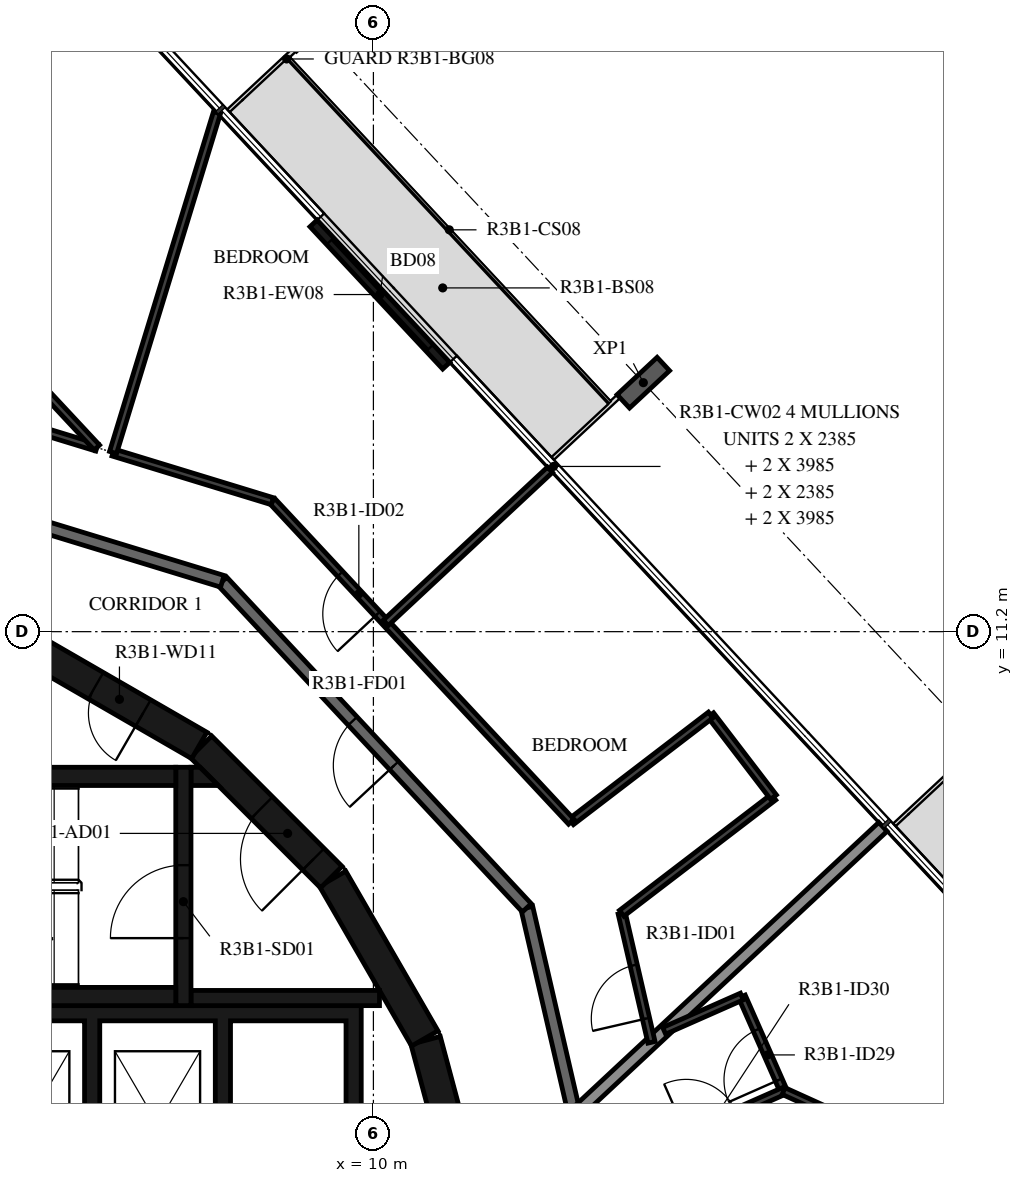
"""IFC4 building model, lengths in metres.
Left out: names, types, materials, properties, quantities, classifications, styles, units other than length and angle.
Written with IfcOpenShell. Run it as: python <this file> out.ifc"""

import sys

from ifc_helpers import new_model, si_unit, direction, frame, frame_2d, origin, origin_2d, place, context, subcontext, project, spatial, polyline, rectangle, i_section, outline, extrude, element, fill, save


model = new_model("IFC4")
c1 = context("Model", 3, precision=1e-05, world=origin(), true_north=direction((0.0, 1.0)))
c2 = subcontext(c1, "Body", "Model", "MODEL_VIEW")
j1 = project(units=[si_unit("LENGTHUNIT", "METRE"), si_unit("PLANEANGLEUNIT", "RADIAN")], contexts=[c1])
p1 = place(None, origin())
s1 = spatial("IfcSite", under=j1, at=p1, CompositionType="ELEMENT")
p2 = place(p1, origin())
s2 = spatial("IfcBuilding", under=s1, at=p2, CompositionType="ELEMENT")
p3 = place(p2, frame((0.0, 0.0, 123.9)))
s3 = spatial("IfcBuildingStorey", under=s2, at=p3, CompositionType="ELEMENT", Elevation=123.9)
p4 = place(p3, frame((14.439, 15.294, -0.38), z_axis=(0.0, 0.0, 1.0), x_axis=(0.68199801865, -0.731354019992, 0.0)))
e1 = element("IfcColumn", 1, at=p4, inside=s3, PredefinedType="COLUMN", context=c2, shape_type="SweptSolid", body=[
    extrude(i_section(OverallWidth=0.3, OverallDepth=0.9, WebThickness=0.019, FlangeThickness=0.035, FilletRadius=0.03, at=origin_2d()), origin(), (0.0, 0.0, 1.0), 3.5),
])
p5 = place(p3, frame((11.198, 15.574, 0.0), z_axis=(0.0, 0.0, 1.0), x_axis=(-0.681994703002, 0.731357111866, 0.0)))
e2 = element("IfcWall", 2, at=p5, inside=s3, PredefinedType="STANDARD", context=c2, shape_type="SweptSolid", body=[
    extrude(rectangle(XDim=3.2, YDim=0.16, at=frame_2d((1.6, 0.0))), origin(), (0.0, 0.0, 1.0), 3.12),
])
p6 = place(p5, frame((0.4, 0.0, 0.0)))
e3 = element("IfcOpeningElement", 3, at=p6, cuts=e2, PredefinedType="OPENING", context=c2, shape_type="SweptSolid", body=[
    extrude(rectangle(XDim=2.4, YDim=2.4, at=frame_2d((1.2, 1.2))), frame((0.0, 0.09, 0.0), z_axis=(0.0, -1.0, 0.0), x_axis=(1.0, 0.0, 0.0)), (0.0, 0.0, 1.0), 0.18),
])
for number, where, z_axis, x_axis in (
    (4, (11.643, 1.55, 0.0), (0.0, 0.0, 1.0), (-0.259, 0.966, 0.0)),
    (5, (10.845, 4.51, 0.0), (0.0, 0.0, 1.0), (-0.5, 0.866, 0.0)),
):
    element("IfcWall", number, at=place(p3, frame(where, z_axis=z_axis, x_axis=x_axis)), inside=s3, PredefinedType="SHEAR", context=c2, shape_type="SweptSolid", body=[
        extrude(rectangle(XDim=3.033, YDim=0.5, at=frame_2d((1.516, 0.0))), origin(), (0.0, 0.0, 1.0), 3.12),
    ])
p7 = place(p3, frame((9.308, 7.164, 0.0), z_axis=(0.0, 0.0, 1.0), x_axis=(-0.707106781187, 0.707106781187, 0.0)))
e6 = element("IfcWall", 6, at=p7, inside=s3, PredefinedType="SHEAR", context=c2, shape_type="SweptSolid", body=[
    extrude(rectangle(XDim=3.032, YDim=0.5, at=frame_2d((1.516, 0.0))), origin(), (0.0, 0.0, 1.0), 3.12),
])
p8 = place(p7, frame((0.416, 0.0, 0.0)))
e7 = element("IfcOpeningElement", 7, at=p8, cuts=e6, PredefinedType="OPENING", context=c2, shape_type="SweptSolid", body=[
    extrude(rectangle(XDim=1.2, YDim=2.1, at=frame_2d((0.6, 1.05))), frame((0.0, 0.26, 0.0), z_axis=(0.0, -1.0, 0.0), x_axis=(1.0, 0.0, 0.0)), (0.0, 0.0, 1.0), 0.52),
])
p9 = place(p3, frame((7.137, 9.329, 0.0), z_axis=(0.0, 0.0, 1.0), x_axis=(-0.865975092491, 0.500087131594, 0.0)))
e8 = element("IfcWall", 8, at=p9, inside=s3, PredefinedType="SHEAR", context=c2, shape_type="SweptSolid", body=[
    extrude(rectangle(XDim=3.033, YDim=0.5, at=frame_2d((1.516, 0.0))), origin(), (0.0, 0.0, 1.0), 3.12),
])
p10 = place(p9, frame((1.066, 0.0, 0.0)))
e9 = element("IfcOpeningElement", 9, at=p10, cuts=e8, PredefinedType="OPENING", context=c2, shape_type="SweptSolid", body=[
    extrude(rectangle(XDim=0.9, YDim=2.1, at=frame_2d((0.45, 1.05))), frame((0.0, 0.26, 0.0), z_axis=(0.0, -1.0, 0.0), x_axis=(1.0, 0.0, 0.0)), (0.0, 0.0, 1.0), 0.52),
])
for number, where, z_axis, x_axis in (
    (10, (0.0, 5.2, 0.0), (0.0, 0.0, 1.0), (1.0, 0.0, 0.0)),
    (11, (0.0, 8.82, 0.0), (0.0, 0.0, 1.0), (1.0, 0.0, 0.0)),
):
    element("IfcWall", number, at=place(p3, frame(where, z_axis=z_axis, x_axis=x_axis)), inside=s3, PredefinedType="SHEAR", context=c2, shape_type="SweptSolid", body=[
        extrude(rectangle(XDim=6.75, YDim=0.3, at=frame_2d((3.375, 0.0))), origin(), (0.0, 0.0, 1.0), 3.12),
    ])
p11 = place(p3, frame((6.875, 5.05, 0.0), z_axis=(0.0, 0.0, 1.0), x_axis=(0.0, 1.0, 0.0)))
e12 = element("IfcWall", 12, at=p11, inside=s3, PredefinedType="SHEAR", context=c2, shape_type="SweptSolid", body=[
    extrude(rectangle(XDim=3.92, YDim=0.25, at=frame_2d((1.96, 0.0))), origin(), (0.0, 0.0, 1.0), 3.12),
])
p12 = place(p11, frame((1.11, 0.0, 0.0)))
e13 = element("IfcOpeningElement", 13, at=p12, cuts=e12, PredefinedType="OPENING", context=c2, shape_type="SweptSolid", body=[
    extrude(rectangle(XDim=1.2, YDim=2.1, at=frame_2d((0.6, 1.05))), frame((0.0, 0.135, 0.0), z_axis=(0.0, -1.0, 0.0), x_axis=(1.0, 0.0, 0.0)), (0.0, 0.0, 1.0), 0.27),
])
p13 = place(p3, frame((7.0, 5.175, 0.0), z_axis=(0.0, 0.0, 1.0), x_axis=(1.0, 0.0, 0.0)))
e14 = element("IfcWall", 14, at=p13, inside=s3, PredefinedType="SHEAR", context=c2, shape_type="SweptSolid", body=[
    extrude(rectangle(XDim=3.1, YDim=0.25, at=frame_2d((1.55, 0.0))), origin(), (0.0, 0.0, 1.0), 3.12),
])
p14 = place(p3, origin())
e15 = element("IfcWall", 15, at=p14, inside=s3, PredefinedType="SHEAR", context=c2, shape_type="SweptSolid", body=[
    extrude(outline(polyline([(7.448, 8.67), (7.0, 8.67), (7.0, 8.97), (7.148, 8.97), (7.448, 8.67)])), origin(), (0.0, 0.0, 1.0), 3.12),
])
p15 = place(p3, origin())
e16 = element("IfcWall", 16, at=p15, inside=s3, PredefinedType="SHEAR", context=c2, shape_type="SweptSolid", body=[
    extrude(outline(polyline([(-9.55, 4.8), (-7.65, 4.8), (-7.65, 1.9), (-7.4, 1.9), (-7.4, 4.8), (-5.5, 4.8), (-5.5, 1.9), (-5.25, 1.9), (-5.25, 4.8), (-3.35, 4.8), (-3.35, 1.9), (-3.1, 1.9), (-3.1, 4.8), (-1.2, 4.8), (-1.2, 1.9), (-0.95, 1.9), (-0.95, 4.8), (3.1, 4.8), (3.1, 1.9), (3.35, 1.9), (3.35, 4.8), (5.25, 4.8), (5.25, 1.9), (5.5, 1.9), (5.5, 4.8), (7.4, 4.8), (7.4, 1.9), (7.65, 1.9), (7.65, 4.8), (9.55, 4.8), (9.55, 1.9), (9.8, 1.9), (9.8, 4.8), (9.8, 5.05), (-9.8, 5.05), (-9.8, 4.8), (-9.8, 1.9), (-9.55, 1.9), (-9.55, 4.8)])), origin(), (0.0, 0.0, 1.0), 3.12),
])
p16 = place(p3, frame((14.175, -0.495, 0.0), z_axis=(0.0, 0.0, 1.0), x_axis=(-0.224922649383, 0.974376622151, 0.0)))
e17 = element("IfcWall", 17, at=p16, inside=s3, PredefinedType="STANDARD", context=c2, shape_type="SweptSolid", body=[
    extrude(rectangle(XDim=7.342, YDim=0.2, at=frame_2d((3.671, 0.0))), origin(), (0.0, 0.0, 1.0), 3.12),
])
p17 = place(p16, frame((2.655, 0.0, 0.0)))
e18 = element("IfcOpeningElement", 18, at=p17, cuts=e17, PredefinedType="OPENING", context=c2, shape_type="SweptSolid", body=[
    extrude(rectangle(XDim=1.0, YDim=2.1, at=frame_2d((0.5, 1.05))), frame((0.0, 0.11, 0.0), z_axis=(0.0, -1.0, 0.0), x_axis=(1.0, 0.0, 0.0)), (0.0, 0.0, 1.0), 0.22),
])
p18 = place(p3, frame((12.523, 6.659, 0.0), z_axis=(0.0, 0.0, 1.0), x_axis=(-0.682001841105, 0.731350455479, 0.0)))
e19 = element("IfcWall", 19, at=p18, inside=s3, PredefinedType="STANDARD", context=c2, shape_type="SweptSolid", body=[
    extrude(rectangle(XDim=7.342, YDim=0.2, at=frame_2d((3.671, 0.0))), origin(), (0.0, 0.0, 1.0), 3.12),
])
p19 = place(p18, frame((3.2, 0.0, 0.0)))
e20 = element("IfcOpeningElement", 20, at=p19, cuts=e19, PredefinedType="OPENING", context=c2, shape_type="SweptSolid", body=[
    extrude(rectangle(XDim=1.0, YDim=2.1, at=frame_2d((0.5, 1.05))), frame((0.0, 0.11, 0.0), z_axis=(0.0, -1.0, 0.0), x_axis=(1.0, 0.0, 0.0)), (0.0, 0.0, 1.0), 0.22),
])
p20 = place(p3, frame((7.516, 12.028, 0.0), z_axis=(0.0, 0.0, 1.0), x_axis=(-0.956306642771, 0.292365533182, 0.0)))
e21 = element("IfcWall", 21, at=p20, inside=s3, PredefinedType="STANDARD", context=c2, shape_type="SweptSolid", body=[
    extrude(rectangle(XDim=7.342, YDim=0.2, at=frame_2d((3.671, 0.0))), origin(), (0.0, 0.0, 1.0), 3.12),
])
p21 = place(p3, frame((13.308, 3.261, 0.0), z_axis=(0.0, 0.0, 1.0), x_axis=(0.731356087831, 0.681995801154, 0.0)))
e22 = element("IfcWall", 22, at=p21, inside=s3, PredefinedType="STANDARD", context=c2, shape_type="SweptSolid", body=[
    extrude(rectangle(XDim=6.934, YDim=0.2, at=frame_2d((3.467, 0.0))), origin(), (0.0, 0.0, 1.0), 2.73),
])
p22 = place(p3, frame((14.573, 4.447, 0.0), z_axis=(0.0, 0.0, 1.0), x_axis=(-0.225006886074, 0.97435717333, 0.0)))
e23 = element("IfcWall", 23, at=p22, inside=s3, PredefinedType="PARTITIONING", context=c2, shape_type="SweptSolid", body=[
    extrude(rectangle(XDim=2.178, YDim=0.12, at=frame_2d((1.089, 0.0))), origin(), (0.0, 0.0, 1.0), 3.12),
])
p23 = place(p22, frame((0.4, 0.0, 0.0)))
e24 = element("IfcOpeningElement", 24, at=p23, cuts=e23, PredefinedType="OPENING", context=c2, shape_type="SweptSolid", body=[
    extrude(rectangle(XDim=0.9, YDim=2.1, at=frame_2d((0.45, 1.05))), frame((0.0, 0.07, 0.0), z_axis=(0.0, -1.0, 0.0), x_axis=(1.0, 0.0, 0.0)), (0.0, 0.0, 1.0), 0.14),
])
p24 = place(p3, frame((14.083, 6.569, 0.0), z_axis=(0.0, 0.0, 1.0), x_axis=(0.794099847012, 0.607787325449, 0.0)))
e25 = element("IfcWall", 25, at=p24, inside=s3, PredefinedType="PARTITIONING", context=c2, shape_type="SweptSolid", body=[
    extrude(rectangle(XDim=3.144, YDim=0.12, at=frame_2d((1.572, 0.0))), origin(), (0.0, 0.0, 1.0), 3.12),
])
p25 = place(p3, frame((16.58, 8.479, 0.0), z_axis=(0.0, 0.0, 1.0), x_axis=(-0.607897770777, 0.794015302298, 0.0)))
e26 = element("IfcWall", 26, at=p25, inside=s3, PredefinedType="PARTITIONING", context=c2, shape_type="SweptSolid", body=[
    extrude(rectangle(XDim=1.7, YDim=0.12, at=frame_2d((0.85, 0.0))), origin(), (0.0, 0.0, 1.0), 3.12),
])
p26 = place(p3, frame((15.546, 9.829, 0.0), z_axis=(0.0, 0.0, 1.0), x_axis=(-0.794096114645, -0.607792201912, 0.0)))
e27 = element("IfcWall", 27, at=p26, inside=s3, PredefinedType="PARTITIONING", context=c2, shape_type="SweptSolid", body=[
    extrude(rectangle(XDim=2.887, YDim=0.12, at=frame_2d((1.443, 0.0))), origin(), (0.0, 0.0, 1.0), 3.12),
])
p27 = place(p3, frame((13.254, 8.075, 0.0), z_axis=(0.0, 0.0, 1.0), x_axis=(-0.681995901471, 0.731355994285, 0.0)))
e28 = element("IfcWall", 28, at=p27, inside=s3, PredefinedType="PARTITIONING", context=c2, shape_type="SweptSolid", body=[
    extrude(rectangle(XDim=7.207, YDim=0.12, at=frame_2d((3.603, 0.0))), origin(), (0.0, 0.0, 1.0), 3.12),
])
p28 = place(p27, frame((4.672, 0.0, 0.0)))
e29 = element("IfcOpeningElement", 29, at=p28, cuts=e28, PredefinedType="OPENING", context=c2, shape_type="SweptSolid", body=[
    extrude(rectangle(XDim=0.9, YDim=2.1, at=frame_2d((0.45, 1.05))), frame((0.0, 0.07, 0.0), z_axis=(0.0, -1.0, 0.0), x_axis=(1.0, 0.0, 0.0)), (0.0, 0.0, 1.0), 0.14),
])
p29 = place(p3, frame((8.339, 13.345, 0.0), z_axis=(0.0, 0.0, 1.0), x_axis=(-0.956324586315, 0.292306834695, 0.0)))
e30 = element("IfcWall", 30, at=p29, inside=s3, PredefinedType="PARTITIONING", context=c2, shape_type="SweptSolid", body=[
    extrude(rectangle(XDim=2.74, YDim=0.12, at=frame_2d((1.37, 0.0))), origin(), (0.0, 0.0, 1.0), 3.12),
])
p30 = place(p3, frame((5.453, 14.228, 0.0), z_axis=(0.0, 0.0, 1.0), x_axis=(-0.95630868333, 0.292358858576, 0.0)))
e31 = element("IfcWall", 31, at=p30, inside=s3, PredefinedType="PARTITIONING", context=c2, shape_type="SweptSolid", body=[
    extrude(rectangle(XDim=5.127, YDim=0.12, at=frame_2d((2.564, 0.0))), origin(), (0.0, 0.0, 1.0), 3.12),
])
p31 = place(p30, frame((1.5, 0.0, 0.0)))
e32 = element("IfcOpeningElement", 32, at=p31, cuts=e31, PredefinedType="OPENING", context=c2, shape_type="SweptSolid", body=[
    extrude(rectangle(XDim=0.9, YDim=2.1, at=frame_2d((0.45, 1.05))), frame((0.0, 0.07, 0.0), z_axis=(0.0, -1.0, 0.0), x_axis=(1.0, 0.0, 0.0)), (0.0, 0.0, 1.0), 0.14),
])
p32 = place(p3, frame((12.903, 13.862, 0.0), z_axis=(0.0, 0.0, 1.0), x_axis=(-0.731380732155, -0.68196937221, 0.0)))
e33 = element("IfcWall", 33, at=p32, inside=s3, PredefinedType="PARTITIONING", context=c2, shape_type="SweptSolid", body=[
    extrude(rectangle(XDim=3.691, YDim=0.12, at=frame_2d((1.845, 0.0))), origin(), (0.0, 0.0, 1.0), 2.73),
])
p33 = place(p3, frame((7.427, 19.734, 0.0), z_axis=(0.0, 0.0, 1.0), x_axis=(-0.292365007065, -0.956306803617, 0.0)))
e34 = element("IfcWall", 34, at=p33, inside=s3, PredefinedType="PARTITIONING", context=c2, shape_type="SweptSolid", body=[
    extrude(rectangle(XDim=5.844, YDim=0.12, at=frame_2d((2.922, 0.0))), origin(), (0.0, 0.0, 1.0), 3.12),
])
p34 = place(p3, frame((-2.646, 22.912, 0.0), z_axis=(0.0, 0.0, 1.0), x_axis=(0.68200318122, -0.731349205788, 0.0)))
e35 = element("IfcWall", 35, at=p34, inside=s3, PredefinedType="PARTITIONING", context=c2, shape_type="SweptSolid", body=[
    extrude(rectangle(XDim=11.874, YDim=0.12, at=frame_2d((5.937, 0.0))), origin(), (0.0, 0.0, 1.0), 3.12),
])
p35 = place(p34, frame((5.752, 0.0, 0.0)))
e36 = element("IfcOpeningElement", 36, at=p35, cuts=e35, PredefinedType="OPENING", context=c2, shape_type="SweptSolid", body=[
    extrude(rectangle(XDim=0.9, YDim=2.1, at=frame_2d((0.45, 1.05))), frame((0.0, 0.07, 0.0), z_axis=(0.0, -1.0, 0.0), x_axis=(1.0, 0.0, 0.0)), (0.0, 0.0, 1.0), 0.14),
])
p36 = place(p34, frame((1.324, 0.0, 0.0)))
e37 = element("IfcOpeningElement", 37, at=p36, cuts=e35, PredefinedType="OPENING", context=c2, shape_type="SweptSolid", body=[
    extrude(rectangle(XDim=0.9, YDim=2.1, at=frame_2d((0.45, 1.05))), frame((0.0, 0.07, 0.0), z_axis=(0.0, -1.0, 0.0), x_axis=(1.0, 0.0, 0.0)), (0.0, 0.0, 1.0), 0.14),
])
p37 = place(p3, frame((16.747, 3.645, 0.0), z_axis=(0.0, 0.0, 1.0), x_axis=(-0.40401852801, 0.914750801598, 0.0)))
e38 = element("IfcWall", 38, at=p37, inside=s3, PredefinedType="PARTITIONING", context=c2, shape_type="SweptSolid", body=[
    extrude(rectangle(XDim=1.7, YDim=0.12, at=frame_2d((0.85, 0.0))), origin(), (0.0, 0.0, 1.0), 3.12),
])
p38 = place(p37, frame((0.2, 0.0, 0.0)))
e39 = element("IfcOpeningElement", 39, at=p38, cuts=e38, PredefinedType="OPENING", context=c2, shape_type="SweptSolid", body=[
    extrude(rectangle(XDim=0.9, YDim=2.1, at=frame_2d((0.45, 1.05))), frame((0.0, 0.07, 0.0), z_axis=(0.0, -1.0, 0.0), x_axis=(1.0, 0.0, 0.0)), (0.0, 0.0, 1.0), 0.14),
])
p39 = place(p3, frame((16.06, 5.2, 0.0), z_axis=(0.0, 0.0, 1.0), x_axis=(-0.91479626238, -0.403915583179, 0.0)))
e40 = element("IfcWall", 40, at=p39, inside=s3, PredefinedType="PARTITIONING", context=c2, shape_type="SweptSolid", body=[
    extrude(rectangle(XDim=1.397, YDim=0.12, at=frame_2d((0.698, 0.0))), origin(), (0.0, 0.0, 1.0), 3.12),
])
p40 = place(p3, frame((14.962, 2.857, 0.0), z_axis=(0.0, 0.0, 1.0), x_axis=(0.914732858216, 0.404059151734, 0.0)))
e41 = element("IfcWall", 41, at=p40, inside=s3, PredefinedType="PARTITIONING", context=c2, shape_type="SweptSolid", body=[
    extrude(rectangle(XDim=1.951, YDim=0.12, at=frame_2d((0.976, 0.0))), origin(), (0.0, 0.0, 1.0), 3.12),
])
p41 = place(p40, frame((0.2, 0.0, 0.0)))
e42 = element("IfcOpeningElement", 42, at=p41, cuts=e41, PredefinedType="OPENING", context=c2, shape_type="SweptSolid", body=[
    extrude(rectangle(XDim=0.9, YDim=2.1, at=frame_2d((0.45, 1.05))), frame((0.0, 0.07, 0.0), z_axis=(0.0, -1.0, 0.0), x_axis=(1.0, 0.0, 0.0)), (0.0, 0.0, 1.0), 0.14),
])
p42 = place(p3, frame((16.747, 3.645, 0.0), z_axis=(0.0, 0.0, 1.0), x_axis=(0.910796273175, -0.412856087238, 0.0)))
e43 = element("IfcWall", 43, at=p42, inside=s3, PredefinedType="PARTITIONING", context=c2, shape_type="SweptSolid", body=[
    extrude(rectangle(XDim=10.901, YDim=0.12, at=frame_2d((5.45, 0.0))), origin(), (0.0, 0.0, 1.0), 3.12),
])
p43 = place(p6, origin())
e44 = element("IfcDoor", 44, at=p43, inside=s3, OperationType="DOUBLE_DOOR_SLIDING", PredefinedType="DOOR", context=c2, shape_type="SweptSolid", body=[
    extrude(rectangle(XDim=2.4, YDim=2.4, at=frame_2d((1.2, 1.2))), frame((0.0, 0.025, 0.0), z_axis=(0.0, -1.0, 0.0), x_axis=(1.0, 0.0, 0.0)), (0.0, 0.0, 1.0), 0.05),
])
fill(e3, e44)
p44 = place(p12, origin())
e45 = element("IfcDoor", 45, at=p44, inside=s3, OperationType="SINGLE_SWING_LEFT", PredefinedType="DOOR", context=c2, shape_type="SweptSolid", body=[
    extrude(rectangle(XDim=1.2, YDim=2.1, at=frame_2d((0.6, 1.05))), frame((0.0, 0.025, 0.0), z_axis=(0.0, -1.0, 0.0), x_axis=(1.0, 0.0, 0.0)), (0.0, 0.0, 1.0), 0.05),
])
fill(e13, e45)
p45 = place(p8, origin())
e46 = element("IfcDoor", 46, at=p45, inside=s3, OperationType="SINGLE_SWING_RIGHT", PredefinedType="DOOR", context=c2, shape_type="SweptSolid", body=[
    extrude(rectangle(XDim=1.2, YDim=2.1, at=frame_2d((0.6, 1.05))), frame((0.0, 0.025, 0.0), z_axis=(0.0, -1.0, 0.0), x_axis=(1.0, 0.0, 0.0)), (0.0, 0.0, 1.0), 0.05),
])
fill(e7, e46)
p46 = place(p10, origin())
e47 = element("IfcDoor", 47, at=p46, inside=s3, OperationType="SINGLE_SWING_RIGHT", PredefinedType="DOOR", context=c2, shape_type="SweptSolid", body=[
    extrude(rectangle(XDim=0.9, YDim=2.1, at=frame_2d((0.45, 1.05))), frame((0.0, 0.025, 0.0), z_axis=(0.0, -1.0, 0.0), x_axis=(1.0, 0.0, 0.0)), (0.0, 0.0, 1.0), 0.05),
])
fill(e9, e47)
p47 = place(p19, origin())
e48 = element("IfcDoor", 48, at=p47, inside=s3, OperationType="SINGLE_SWING_RIGHT", PredefinedType="DOOR", context=c2, shape_type="SweptSolid", body=[
    extrude(rectangle(XDim=1.0, YDim=2.1, at=frame_2d((0.5, 1.05))), frame((0.0, 0.025, 0.0), z_axis=(0.0, -1.0, 0.0), x_axis=(1.0, 0.0, 0.0)), (0.0, 0.0, 1.0), 0.05),
])
fill(e20, e48)
p48 = place(p23, origin())
e49 = element("IfcDoor", 49, at=p48, inside=s3, OperationType="SINGLE_SWING_LEFT", PredefinedType="DOOR", context=c2, shape_type="SweptSolid", body=[
    extrude(rectangle(XDim=0.9, YDim=2.1, at=frame_2d((0.45, 1.05))), frame((0.0, 0.025, 0.0), z_axis=(0.0, -1.0, 0.0), x_axis=(1.0, 0.0, 0.0)), (0.0, 0.0, 1.0), 0.05),
])
fill(e24, e49)
p49 = place(p28, origin())
e50 = element("IfcDoor", 50, at=p49, inside=s3, OperationType="SINGLE_SWING_RIGHT", PredefinedType="DOOR", context=c2, shape_type="SweptSolid", body=[
    extrude(rectangle(XDim=0.9, YDim=2.1, at=frame_2d((0.45, 1.05))), frame((0.0, 0.025, 0.0), z_axis=(0.0, -1.0, 0.0), x_axis=(1.0, 0.0, 0.0)), (0.0, 0.0, 1.0), 0.05),
])
fill(e29, e50)
p50 = place(p38, origin())
e51 = element("IfcDoor", 51, at=p50, inside=s3, OperationType="SINGLE_SWING_LEFT", PredefinedType="DOOR", context=c2, shape_type="SweptSolid", body=[
    extrude(rectangle(XDim=0.9, YDim=2.1, at=frame_2d((0.45, 1.05))), frame((0.0, 0.025, 0.0), z_axis=(0.0, -1.0, 0.0), x_axis=(1.0, 0.0, 0.0)), (0.0, 0.0, 1.0), 0.05),
])
fill(e39, e51)
save(model, sys.argv[1])
